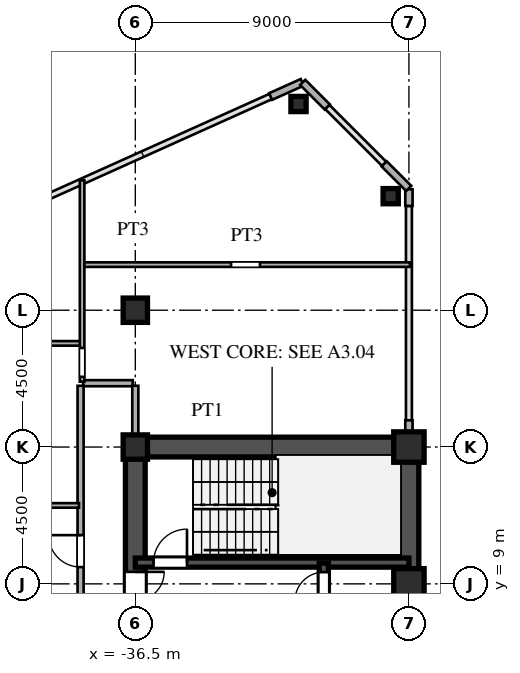
"""IFC4 building model, lengths in metres.
Left out: names, types, materials, properties, quantities, classifications, styles, units other than length and angle.
Written with IfcOpenShell. Run it as: python <this file> out.ifc"""

import sys

from ifc_helpers import new_model, si_unit, direction, frame, frame_2d, origin, origin_2d, place, context, subcontext, project, spatial, rectangle, hollow_rectangle, i_section, extrude, source, transform, mapped, element, fill, save


model = new_model("IFC4")
c1 = context("Model", 3, precision=1e-05, world=origin(), true_north=direction((0.0, 1.0)))
c2 = subcontext(c1, "Body", "Model", "MODEL_VIEW")
j1 = project(units=[si_unit("LENGTHUNIT", "METRE"), si_unit("PLANEANGLEUNIT", "RADIAN")], contexts=[c1])
p1 = place(None, origin())
s1 = spatial("IfcSite", under=j1, at=p1, CompositionType="ELEMENT")
p2 = place(p1, origin())
s2 = spatial("IfcBuilding", under=s1, at=p2, CompositionType="ELEMENT")
p3 = place(p2, frame((0.0, 0.0, 76.5)))
s3 = spatial("IfcBuildingStorey", under=s2, at=p3, CompositionType="ELEMENT", Elevation=76.5)
m1 = source(origin(), c2, "Body", "SweptSolid", [
    extrude(hollow_rectangle(XDim=1.0, YDim=1.0, WallThickness=0.042, at=origin_2d()), origin(), (0.0, 0.0, 1.0), 3.6),
])
for number, where, z_axis, x_axis in (
    (1, (-27.5, 9.0, 0.0), (0.0, 0.0, 1.0), (1.0, 0.0, 0.0)),
    (2, (-27.5, 13.5, 0.0), (0.0, 0.0, 1.0), (1.0, 0.0, 0.0)),
):
    element("IfcColumn", number, at=place(p3, frame(where, z_axis=z_axis, x_axis=x_axis)), inside=s3, PredefinedType="COLUMN", context=c2, shape_type="MappedRepresentation", body=[
        mapped(m1, transform((0.0, 0.0, 0.0), scale=1.0)),
    ])
m2 = source(origin(), c2, "Body", "SweptSolid", [
    extrude(i_section(OverallWidth=0.8, OverallDepth=0.8, WebThickness=0.032, FlangeThickness=0.05, at=origin_2d()), origin(), (0.0, 0.0, 1.0), 3.6),
])
for number, where, z_axis, x_axis in (
    (3, (-36.5, 13.5, 0.0), (0.0, 0.0, 1.0), (1.0, 0.0, 0.0)),
    (4, (-36.5, 18.0, 0.0), (0.0, 0.0, 1.0), (1.0, 0.0, 0.0)),
):
    element("IfcColumn", number, at=place(p3, frame(where, z_axis=z_axis, x_axis=x_axis)), inside=s3, PredefinedType="COLUMN", context=c2, shape_type="MappedRepresentation", body=[
        mapped(m2, transform((0.0, 0.0, 0.0), scale=1.0)),
    ])
m3 = source(origin(), c2, "Body", "SweptSolid", [
    extrude(hollow_rectangle(XDim=0.5, YDim=0.5, WallThickness=0.02, at=origin_2d()), origin(), (0.0, 0.0, 1.0), 3.6),
])
for number, where, z_axis, x_axis in (
    (5, (-28.1, 21.751, 0.0), (0.0, 0.0, 1.0), (1.0, 0.0, 0.0)),
    (6, (-31.131, 24.783, 0.0), (0.0, 0.0, 1.0), (1.0, 0.0, 0.0)),
):
    element("IfcColumn", number, at=place(p3, frame(where, z_axis=z_axis, x_axis=x_axis)), inside=s3, PredefinedType="COLUMN", context=c2, shape_type="MappedRepresentation", body=[
        mapped(m3, transform((0.0, 0.0, 0.0), scale=1.0)),
    ])
p4 = place(p3, frame((-27.5, 13.83, 0.0), z_axis=(0.0, 0.0, 1.0), x_axis=(0.0, 1.0, 0.0)))
e7 = element("IfcWall", 7, at=p4, inside=s3, PredefinedType="SOLIDWALL", context=c2, shape_type="SweptSolid", body=[
    extrude(rectangle(XDim=0.55, YDim=0.24, at=frame_2d((0.275, 0.0))), origin(), (0.0, 0.0, 1.0), 2.88),
])
p5 = place(p3, frame((-27.5, 21.43, 0.0), z_axis=(0.0, 0.0, 1.0), x_axis=(0.0, 1.0, 0.0)))
e8 = element("IfcWall", 8, at=p5, inside=s3, PredefinedType="SOLIDWALL", context=c2, shape_type="SweptSolid", body=[
    extrude(rectangle(XDim=0.55, YDim=0.24, at=frame_2d((0.275, 0.0))), origin(), (0.0, 0.0, 1.0), 3.38),
])
for number, where, z_axis, x_axis in (
    (9, (-27.507, 22.007, 0.0), (0.0, 0.0, 1.0), (-0.707, 0.707, 0.0)),
    (10, (-30.187, 24.687, 0.0), (0.0, 0.0, 1.0), (-0.707, 0.707, 0.0)),
):
    element("IfcWall", number, at=place(p3, frame(where, z_axis=z_axis, x_axis=x_axis)), inside=s3, PredefinedType="SOLIDWALL", context=c2, shape_type="SweptSolid", body=[
        extrude(rectangle(XDim=1.14, YDim=0.24, at=frame_2d((0.57, 0.0))), origin(), (0.0, 0.0, 1.0), 3.38),
    ])
p6 = place(p3, frame((-31.009, 25.496, 0.0), z_axis=(0.0, 0.0, 1.0), x_axis=(-0.911929519623, -0.410346866979, 0.0)))
e11 = element("IfcWall", 11, at=p6, inside=s3, PredefinedType="SOLIDWALL", context=c2, shape_type="SweptSolid", body=[
    extrude(rectangle(XDim=1.14, YDim=0.24, at=frame_2d((0.57, 0.0))), origin(), (0.0, 0.0, 1.0), 3.38),
])
p7 = place(p3, frame((-27.5, 1.3, 0.0), z_axis=(0.0, 0.0, 1.0), x_axis=(0.0, 1.0, 0.0)))
e12 = element("IfcWall", 12, at=p7, inside=s3, PredefinedType="SHEAR", context=c2, shape_type="SweptSolid", body=[
    extrude(rectangle(XDim=12.2, YDim=0.65, at=frame_2d((6.1, 0.0))), origin(), (0.0, 0.0, 1.0), 3.38),
])
p8 = place(p3, frame((-36.5, 13.5, 0.0), z_axis=(0.0, 0.0, 1.0), x_axis=(1.0, 0.0, 0.0)))
e13 = element("IfcWall", 13, at=p8, inside=s3, PredefinedType="SHEAR", context=c2, shape_type="SweptSolid", body=[
    extrude(rectangle(XDim=9.0, YDim=0.65, at=frame_2d((4.5, 0.0))), origin(), (0.0, 0.0, 1.0), 3.38),
])
p9 = place(p3, frame((-36.5, 8.2, 0.0), z_axis=(0.0, 0.0, 1.0), x_axis=(0.0, 1.0, 0.0)))
e14 = element("IfcWall", 14, at=p9, inside=s3, PredefinedType="SHEAR", context=c2, shape_type="SweptSolid", body=[
    extrude(rectangle(XDim=5.45, YDim=0.65, at=frame_2d((2.725, 0.0))), origin(), (0.0, 0.0, 1.0), 3.38),
])
p10 = place(p9, frame((0.245, 0.0, 0.0)))
e15 = element("IfcOpeningElement", 15, at=p10, cuts=e14, PredefinedType="OPENING", context=c2, shape_type="SweptSolid", body=[
    extrude(rectangle(XDim=0.95, YDim=2.15, at=frame_2d((0.475, 1.075))), frame((0.0, 0.335, 0.0), z_axis=(0.0, -1.0, 0.0), x_axis=(1.0, 0.0, 0.0)), (0.0, 0.0, 1.0), 0.67),
])
p11 = place(p3, frame((-36.5, 9.7, 0.0), z_axis=(0.0, 0.0, 1.0), x_axis=(1.0, 0.0, 0.0)))
e16 = element("IfcWall", 16, at=p11, inside=s3, PredefinedType="SHEAR", context=c2, shape_type="SweptSolid", body=[
    extrude(rectangle(XDim=9.0, YDim=0.3, at=frame_2d((4.5, 0.0))), origin(), (0.0, 0.0, 1.0), 3.38),
])
p12 = place(p11, frame((0.6, 0.0, 0.0)))
e17 = element("IfcOpeningElement", 17, at=p12, cuts=e16, PredefinedType="OPENING", context=c2, shape_type="SweptSolid", body=[
    extrude(rectangle(XDim=1.1, YDim=2.2, at=frame_2d((0.55, 1.1))), frame((0.0, 0.16, 0.0), z_axis=(0.0, -1.0, 0.0), x_axis=(1.0, 0.0, 0.0)), (0.0, 0.0, 1.0), 0.32),
])
p13 = place(p3, frame((-30.3, 8.15, 0.0), z_axis=(0.0, 0.0, 1.0), x_axis=(0.0, 1.0, 0.0)))
e18 = element("IfcWall", 18, at=p13, inside=s3, PredefinedType="SHEAR", context=c2, shape_type="SweptSolid", body=[
    extrude(rectangle(XDim=1.53, YDim=0.3, at=frame_2d((0.765, 0.0))), origin(), (0.0, 0.0, 1.0), 3.38),
])
p14 = place(p13, frame((0.285, 0.0, 0.0)))
e19 = element("IfcOpeningElement", 19, at=p14, cuts=e18, PredefinedType="OPENING", context=c2, shape_type="SweptSolid", body=[
    extrude(rectangle(XDim=0.95, YDim=2.15, at=frame_2d((0.475, 1.075))), frame((0.0, 0.16, 0.0), z_axis=(0.0, -1.0, 0.0), x_axis=(1.0, 0.0, 0.0)), (0.0, 0.0, 1.0), 0.32),
])
p15 = place(p3, frame((-44.4, 11.58, 0.0), z_axis=(0.0, 0.0, 1.0), x_axis=(1.0, 0.0, 0.0)))
e20 = element("IfcWall", 20, at=p15, inside=s3, PredefinedType="PARTITIONING", context=c2, shape_type="SweptSolid", body=[
    extrude(rectangle(XDim=6.05, YDim=0.15, at=frame_2d((3.025, 0.0))), origin(), (0.0, 0.0, 1.0), 3.38),
])
p16 = place(p15, frame((2.55, 0.0, 0.0)))
e21 = element("IfcOpeningElement", 21, at=p16, cuts=e20, PredefinedType="OPENING", context=c2, shape_type="SweptSolid", body=[
    extrude(rectangle(XDim=0.95, YDim=2.15, at=frame_2d((0.475, 1.075))), frame((0.0, 0.085, 0.0), z_axis=(0.0, -1.0, 0.0), x_axis=(1.0, 0.0, 0.0)), (0.0, 0.0, 1.0), 0.17),
])
p17 = place(p3, frame((-38.215, 15.6, 0.0), z_axis=(0.0, 0.0, 1.0), x_axis=(1.0, 0.0, 0.0)))
e22 = element("IfcWall", 22, at=p17, inside=s3, PredefinedType="PARTITIONING", context=c2, shape_type="SweptSolid", body=[
    extrude(rectangle(XDim=1.63, YDim=0.2, at=frame_2d((0.815, 0.0))), origin(), (0.0, 0.0, 1.0), 3.38),
])
p18 = place(p3, frame((-44.4, 16.91, 0.0), z_axis=(0.0, 0.0, 1.0), x_axis=(1.0, 0.0, 0.0)))
e23 = element("IfcWall", 23, at=p18, inside=s3, PredefinedType="PARTITIONING", context=c2, shape_type="SweptSolid", body=[
    extrude(rectangle(XDim=6.1, YDim=0.15, at=frame_2d((3.05, 0.0))), origin(), (0.0, 0.0, 1.0), 3.38),
])
p19 = place(p3, frame((-38.2, 19.5, 0.0), z_axis=(0.0, 0.0, 1.0), x_axis=(1.0, 0.0, 0.0)))
e24 = element("IfcWall", 24, at=p19, inside=s3, PredefinedType="PARTITIONING", context=c2, shape_type="SweptSolid", body=[
    extrude(rectangle(XDim=10.735, YDim=0.15, at=frame_2d((5.367, 0.0))), origin(), (0.0, 0.0, 1.0), 3.38),
])
p20 = place(p19, frame((4.85, 0.0, 0.0)))
e25 = element("IfcOpeningElement", 25, at=p20, cuts=e24, PredefinedType="OPENING", context=c2, shape_type="SweptSolid", body=[
    extrude(rectangle(XDim=0.95, YDim=2.15, at=frame_2d((0.475, 1.075))), frame((0.0, 0.085, 0.0), z_axis=(0.0, -1.0, 0.0), x_axis=(1.0, 0.0, 0.0)), (0.0, 0.0, 1.0), 0.17),
])
p21 = place(p3, frame((-38.3, -15.515, 0.0), z_axis=(0.0, 0.0, 1.0), x_axis=(0.0, 1.0, 0.0)))
e26 = element("IfcWall", 26, at=p21, inside=s3, PredefinedType="PARTITIONING", context=c2, shape_type="SweptSolid", body=[
    extrude(rectangle(XDim=31.03, YDim=0.2, at=frame_2d((15.515, 0.0))), origin(), (0.0, 0.0, 1.0), 3.38),
])
p22 = place(p21, frame((1.345, 0.0, 0.0)))
e27 = element("IfcOpeningElement", 27, at=p22, cuts=e26, PredefinedType="OPENING", context=c2, shape_type="SweptSolid", body=[
    extrude(rectangle(XDim=1.05, YDim=2.25, at=frame_2d((0.525, 1.125))), frame((0.0, 0.11, 0.0), z_axis=(0.0, -1.0, 0.0), x_axis=(1.0, 0.0, 0.0)), (0.0, 0.0, 1.0), 0.22),
])
p23 = place(p21, frame((12.28, 0.0, 0.0)))
e28 = element("IfcOpeningElement", 28, at=p23, cuts=e26, PredefinedType="OPENING", context=c2, shape_type="SweptSolid", body=[
    extrude(rectangle(XDim=1.05, YDim=2.25, at=frame_2d((0.525, 1.125))), frame((0.0, 0.11, 0.0), z_axis=(0.0, -1.0, 0.0), x_axis=(1.0, 0.0, 0.0)), (0.0, 0.0, 1.0), 0.22),
])
p24 = place(p21, frame((25.067, 0.0, 0.0)))
e29 = element("IfcOpeningElement", 29, at=p24, cuts=e26, PredefinedType="OPENING", context=c2, shape_type="SweptSolid", body=[
    extrude(rectangle(XDim=1.05, YDim=2.25, at=frame_2d((0.525, 1.125))), frame((0.0, 0.11, 0.0), z_axis=(0.0, -1.0, 0.0), x_axis=(1.0, 0.0, 0.0)), (0.0, 0.0, 1.0), 0.22),
])
p25 = place(p3, frame((-38.25, 15.65, 0.0), z_axis=(0.0, 0.0, 1.0), x_axis=(0.0, 1.0, 0.0)))
e30 = element("IfcWall", 30, at=p25, inside=s3, PredefinedType="PARTITIONING", context=c2, shape_type="SweptSolid", body=[
    extrude(rectangle(XDim=6.623, YDim=0.15, at=frame_2d((3.312, 0.0))), origin(), (0.0, 0.0, 1.0), 3.38),
])
p26 = place(p25, frame((0.16, 0.0, 0.0)))
e31 = element("IfcOpeningElement", 31, at=p26, cuts=e30, PredefinedType="OPENING", context=c2, shape_type="SweptSolid", body=[
    extrude(rectangle(XDim=0.95, YDim=2.15, at=frame_2d((0.475, 1.075))), frame((0.0, 0.085, 0.0), z_axis=(0.0, -1.0, 0.0), x_axis=(1.0, 0.0, 0.0)), (0.0, 0.0, 1.0), 0.17),
])
p27 = place(p3, frame((-36.5, 13.83, 0.0), z_axis=(0.0, 0.0, 1.0), x_axis=(0.0, 1.0, 0.0)))
e32 = element("IfcWall", 32, at=p27, inside=s3, PredefinedType="PARTITIONING", context=c2, shape_type="SweptSolid", body=[
    extrude(rectangle(XDim=1.685, YDim=0.2, at=frame_2d((0.842, 0.0))), origin(), (0.0, 0.0, 1.0), 2.68),
])
m4 = source(origin(), c2, "Body", "SweptSolid", [
    extrude(rectangle(XDim=0.95, YDim=2.15, at=frame_2d((0.475, 1.075))), frame((0.0, 0.025, 0.0), z_axis=(0.0, -1.0, 0.0), x_axis=(1.0, 0.0, 0.0)), (0.0, 0.0, 1.0), 0.05),
])
p28 = place(p10, frame((0.95, 0.0, 0.0), z_axis=(0.0, 0.0, 1.0), x_axis=(-1.0, 0.0, 0.0)))
e33 = element("IfcDoor", 33, at=p28, inside=s3, OperationType="SINGLE_SWING_RIGHT", PredefinedType="DOOR", context=c2, shape_type="MappedRepresentation", body=[
    mapped(m4, transform((0.0, 0.0, 0.0), scale=1.0)),
])
fill(e15, e33)
m5 = source(origin(), c2, "Body", "SweptSolid", [
    extrude(rectangle(XDim=1.1, YDim=2.2, at=frame_2d((0.55, 1.1))), frame((0.0, 0.025, 0.0), z_axis=(0.0, -1.0, 0.0), x_axis=(1.0, 0.0, 0.0)), (0.0, 0.0, 1.0), 0.05),
])
p29 = place(p12, origin())
e34 = element("IfcDoor", 34, at=p29, inside=s3, OperationType="SINGLE_SWING_RIGHT", PredefinedType="DOOR", context=c2, shape_type="MappedRepresentation", body=[
    mapped(m5, transform((0.0, 0.0, 0.0), scale=1.0)),
])
fill(e17, e34)
p30 = place(p14, origin())
e35 = element("IfcDoor", 35, at=p30, inside=s3, OperationType="SINGLE_SWING_LEFT", PredefinedType="DOOR", context=c2, shape_type="MappedRepresentation", body=[
    mapped(m4, transform((0.0, 0.0, 0.0), scale=1.0)),
])
fill(e19, e35)
m6 = source(origin(), c2, "Body", "SweptSolid", [
    extrude(rectangle(XDim=1.05, YDim=2.25, at=frame_2d((0.525, 1.125))), frame((0.0, 0.025, 0.0), z_axis=(0.0, -1.0, 0.0), x_axis=(1.0, 0.0, 0.0)), (0.0, 0.0, 1.0), 0.05),
])
p31 = place(p24, origin())
e36 = element("IfcDoor", 36, at=p31, inside=s3, OperationType="SINGLE_SWING_RIGHT", PredefinedType="DOOR", context=c2, shape_type="MappedRepresentation", body=[
    mapped(m6, transform((0.0, 0.0, 0.0), scale=1.0)),
])
fill(e29, e36)
save(model, sys.argv[1])
